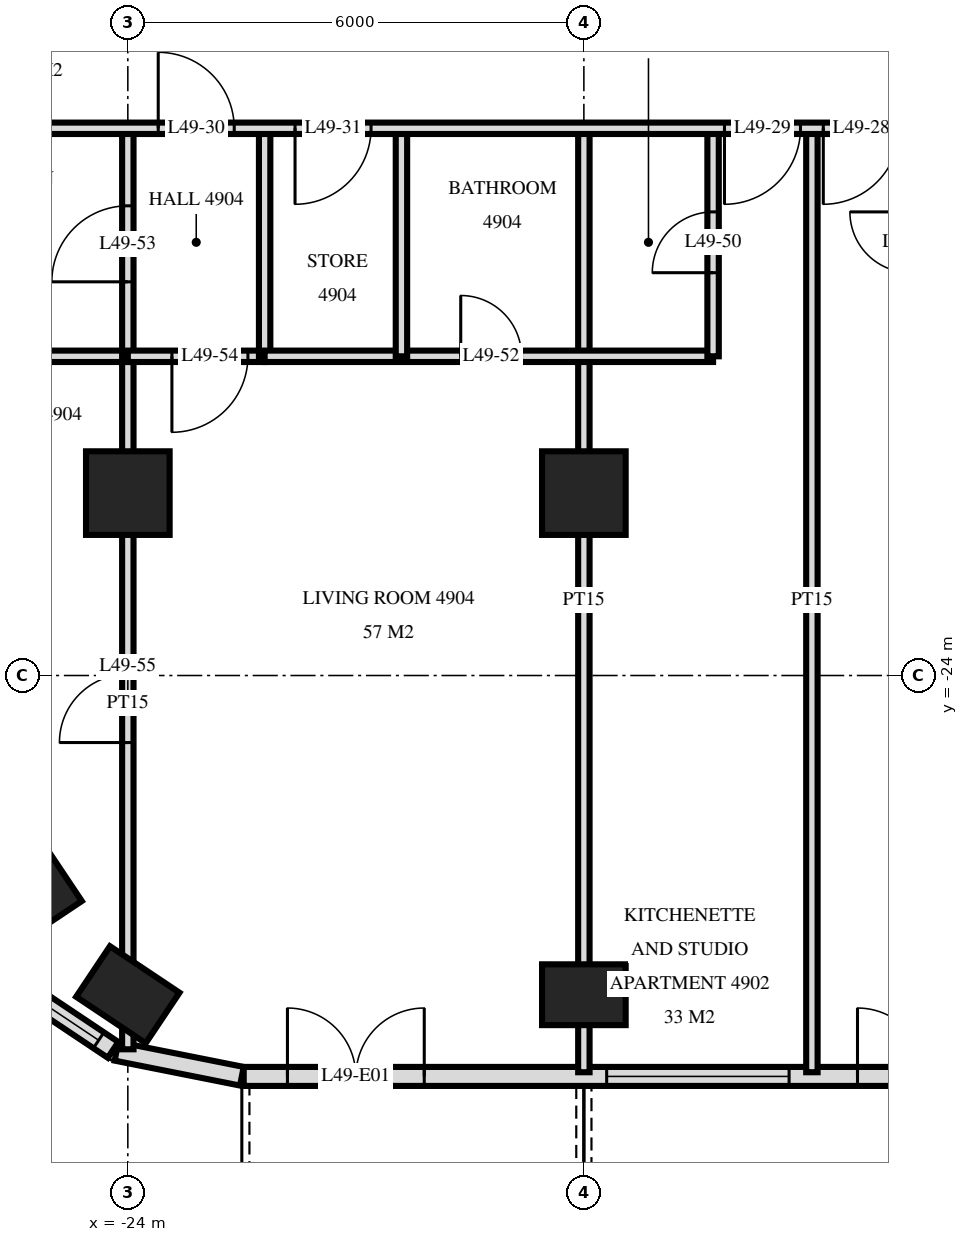
"""IFC4 building model, lengths in metres.
Left out: names, types, materials, properties, quantities, classifications, styles, units other than length and angle.
Written with IfcOpenShell. Run it as: python <this file> out.ifc"""

import sys

from ifc_helpers import new_model, si_unit, direction, frame, frame_2d, origin, origin_2d, place, context, subcontext, project, spatial, rectangle, extrude, element, fill, save


model = new_model("IFC4")
c1 = context("Model", 3, precision=1e-05, world=origin(), true_north=direction((0.0, 1.0)))
c2 = subcontext(c1, "Body", "Model", "MODEL_VIEW")
j1 = project(units=[si_unit("LENGTHUNIT", "METRE"), si_unit("PLANEANGLEUNIT", "RADIAN")], contexts=[c1])
p1 = place(None, origin())
s1 = spatial("IfcSite", under=j1, at=p1, CompositionType="ELEMENT")
p2 = place(p1, origin())
s2 = spatial("IfcBuilding", under=s1, at=p2, CompositionType="ELEMENT")
p3 = place(p2, frame((0.0, 0.0, 190.6)))
s3 = spatial("IfcBuildingStorey", under=s2, at=p3, CompositionType="ELEMENT", Elevation=190.6)
for number, where, z_axis, x_axis in (
    (1, (-25.244, -26.733, 0.0), (0.0, 0.0, 1.0), (-0.556, 0.831, 0.0)),
    (2, (-24.0, -28.2, 0.0), (0.0, 0.0, 1.0), (-0.831, 0.556, 0.0)),
):
    element("IfcColumn", number, at=place(p3, frame(where, z_axis=z_axis, x_axis=x_axis)), inside=s3, PredefinedType="COLUMN", context=c2, shape_type="SweptSolid", body=[
        extrude(rectangle(XDim=1.1, YDim=0.8, at=origin_2d()), origin(), (0.0, 0.0, 1.0), 3.5),
    ])
p4 = place(p3, frame((-24.0, -21.6, 0.0), z_axis=(0.0, 0.0, 1.0), x_axis=(1.0, 0.0, 0.0)))
e3 = element("IfcColumn", 3, at=p4, inside=s3, PredefinedType="COLUMN", context=c2, shape_type="SweptSolid", body=[
    extrude(rectangle(XDim=1.1, YDim=1.1, at=origin_2d()), origin(), (0.0, 0.0, 1.0), 3.5),
])
p5 = place(p3, frame((-18.0, -28.2, 0.0), z_axis=(0.0, 0.0, 1.0), x_axis=(1.0, 0.0, 0.0)))
e4 = element("IfcColumn", 4, at=p5, inside=s3, PredefinedType="COLUMN", context=c2, shape_type="SweptSolid", body=[
    extrude(rectangle(XDim=1.1, YDim=0.8, at=origin_2d()), origin(), (0.0, 0.0, 1.0), 3.5),
])
p6 = place(p3, frame((-18.0, -21.6, 0.0), z_axis=(0.0, 0.0, 1.0), x_axis=(1.0, 0.0, 0.0)))
e5 = element("IfcColumn", 5, at=p6, inside=s3, PredefinedType="COLUMN", context=c2, shape_type="SweptSolid", body=[
    extrude(rectangle(XDim=1.1, YDim=1.1, at=origin_2d()), origin(), (0.0, 0.0, 1.0), 3.5),
])
p7 = place(p3, frame((-25.571, -28.006, 0.0), z_axis=(0.0, 0.0, 1.0), x_axis=(0.831482937015, -0.55555029066, 0.0)))
e6 = element("IfcWall", 6, at=p7, inside=s3, PredefinedType="SOLIDWALL", context=c2, shape_type="SweptSolid", body=[
    extrude(rectangle(XDim=1.656, YDim=0.25, at=frame_2d((0.828, 0.0))), origin(), (0.0, 0.0, 1.0), 3.22),
])
p8 = place(p7, frame((0.228, 0.0, 0.9)))
e7 = element("IfcOpeningElement", 7, at=p8, cuts=e6, PredefinedType="OPENING", context=c2, shape_type="SweptSolid", body=[
    extrude(rectangle(XDim=1.2, YDim=1.5, at=frame_2d((0.6, 0.75))), frame((0.0, 0.135, 0.0), z_axis=(0.0, -1.0, 0.0), x_axis=(1.0, 0.0, 0.0)), (0.0, 0.0, 1.0), 0.27),
])
p9 = place(p3, frame((-24.149, -28.945, 0.0), z_axis=(0.0, 0.0, 1.0), x_axis=(0.980775640221, -0.19513878023, 0.0)))
e8 = element("IfcWall", 8, at=p9, inside=s3, PredefinedType="SOLIDWALL", context=c2, shape_type="SweptSolid", body=[
    extrude(rectangle(XDim=1.681, YDim=0.25, at=frame_2d((0.841, 0.0))), origin(), (0.0, 0.0, 1.0), 3.22),
])
p10 = place(p3, frame((-22.475, -29.275, 0.0), z_axis=(0.0, 0.0, 1.0), x_axis=(1.0, 0.0, 0.0)))
e9 = element("IfcWall", 9, at=p10, inside=s3, PredefinedType="SOLIDWALL", context=c2, shape_type="SweptSolid", body=[
    extrude(rectangle(XDim=44.951, YDim=0.25, at=frame_2d((22.475, 0.0))), origin(), (0.0, 0.0, 1.0), 3.22),
])
p11 = place(p10, frame((0.575, 0.0, 0.0)))
e10 = element("IfcOpeningElement", 10, at=p11, cuts=e9, PredefinedType="OPENING", context=c2, shape_type="SweptSolid", body=[
    extrude(rectangle(XDim=1.8, YDim=2.4, at=frame_2d((0.9, 1.2))), frame((0.0, 0.135, 0.0), z_axis=(0.0, -1.0, 0.0), x_axis=(1.0, 0.0, 0.0)), (0.0, 0.0, 1.0), 0.27),
])
p12 = place(p10, frame((4.775, 0.0, 0.9)))
e11 = element("IfcOpeningElement", 11, at=p12, cuts=e9, PredefinedType="OPENING", context=c2, shape_type="SweptSolid", body=[
    extrude(rectangle(XDim=2.4, YDim=1.5, at=frame_2d((1.2, 0.75))), frame((0.0, 0.135, 0.0), z_axis=(0.0, -1.0, 0.0), x_axis=(1.0, 0.0, 0.0)), (0.0, 0.0, 1.0), 0.27),
])
p13 = place(p10, frame((8.075, 0.0, 0.0)))
e12 = element("IfcOpeningElement", 12, at=p13, cuts=e9, PredefinedType="OPENING", context=c2, shape_type="SweptSolid", body=[
    extrude(rectangle(XDim=1.8, YDim=2.4, at=frame_2d((0.9, 1.2))), frame((0.0, 0.135, 0.0), z_axis=(0.0, -1.0, 0.0), x_axis=(1.0, 0.0, 0.0)), (0.0, 0.0, 1.0), 0.27),
])
p14 = place(p10, frame((11.075, 0.0, 0.0)))
e13 = element("IfcOpeningElement", 13, at=p14, cuts=e9, PredefinedType="OPENING", context=c2, shape_type="SweptSolid", body=[
    extrude(rectangle(XDim=1.8, YDim=2.4, at=frame_2d((0.9, 1.2))), frame((0.0, 0.135, 0.0), z_axis=(0.0, -1.0, 0.0), x_axis=(1.0, 0.0, 0.0)), (0.0, 0.0, 1.0), 0.27),
])
p15 = place(p10, frame((13.775, 0.0, 0.9)))
e14 = element("IfcOpeningElement", 14, at=p15, cuts=e9, PredefinedType="OPENING", context=c2, shape_type="SweptSolid", body=[
    extrude(rectangle(XDim=2.4, YDim=1.5, at=frame_2d((1.2, 0.75))), frame((0.0, 0.135, 0.0), z_axis=(0.0, -1.0, 0.0), x_axis=(1.0, 0.0, 0.0)), (0.0, 0.0, 1.0), 0.27),
])
p16 = place(p10, frame((20.075, 0.0, 0.0)))
e15 = element("IfcOpeningElement", 15, at=p16, cuts=e9, PredefinedType="OPENING", context=c2, shape_type="SweptSolid", body=[
    extrude(rectangle(XDim=1.8, YDim=2.4, at=frame_2d((0.9, 1.2))), frame((0.0, 0.135, 0.0), z_axis=(0.0, -1.0, 0.0), x_axis=(1.0, 0.0, 0.0)), (0.0, 0.0, 1.0), 0.27),
])
p17 = place(p10, frame((23.075, 0.0, 0.0)))
e16 = element("IfcOpeningElement", 16, at=p17, cuts=e9, PredefinedType="OPENING", context=c2, shape_type="SweptSolid", body=[
    extrude(rectangle(XDim=1.8, YDim=2.4, at=frame_2d((0.9, 1.2))), frame((0.0, 0.135, 0.0), z_axis=(0.0, -1.0, 0.0), x_axis=(1.0, 0.0, 0.0)), (0.0, 0.0, 1.0), 0.27),
])
p18 = place(p10, frame((29.075, 0.0, 0.0)))
e17 = element("IfcOpeningElement", 17, at=p18, cuts=e9, PredefinedType="OPENING", context=c2, shape_type="SweptSolid", body=[
    extrude(rectangle(XDim=1.8, YDim=2.4, at=frame_2d((0.9, 1.2))), frame((0.0, 0.135, 0.0), z_axis=(0.0, -1.0, 0.0), x_axis=(1.0, 0.0, 0.0)), (0.0, 0.0, 1.0), 0.27),
])
p19 = place(p10, frame((31.775, 0.0, 0.9)))
e18 = element("IfcOpeningElement", 18, at=p19, cuts=e9, PredefinedType="OPENING", context=c2, shape_type="SweptSolid", body=[
    extrude(rectangle(XDim=2.4, YDim=1.5, at=frame_2d((1.2, 0.75))), frame((0.0, 0.135, 0.0), z_axis=(0.0, -1.0, 0.0), x_axis=(1.0, 0.0, 0.0)), (0.0, 0.0, 1.0), 0.27),
])
p20 = place(p10, frame((35.075, 0.0, 0.0)))
e19 = element("IfcOpeningElement", 19, at=p20, cuts=e9, PredefinedType="OPENING", context=c2, shape_type="SweptSolid", body=[
    extrude(rectangle(XDim=1.8, YDim=2.4, at=frame_2d((0.9, 1.2))), frame((0.0, 0.135, 0.0), z_axis=(0.0, -1.0, 0.0), x_axis=(1.0, 0.0, 0.0)), (0.0, 0.0, 1.0), 0.27),
])
p21 = place(p10, frame((37.775, 0.0, 0.9)))
e20 = element("IfcOpeningElement", 20, at=p21, cuts=e9, PredefinedType="OPENING", context=c2, shape_type="SweptSolid", body=[
    extrude(rectangle(XDim=2.4, YDim=1.5, at=frame_2d((1.2, 0.75))), frame((0.0, 0.135, 0.0), z_axis=(0.0, -1.0, 0.0), x_axis=(1.0, 0.0, 0.0)), (0.0, 0.0, 1.0), 0.27),
])
p22 = place(p10, frame((41.075, 0.0, 0.0)))
e21 = element("IfcOpeningElement", 21, at=p22, cuts=e9, PredefinedType="OPENING", context=c2, shape_type="SweptSolid", body=[
    extrude(rectangle(XDim=1.8, YDim=2.4, at=frame_2d((0.9, 1.2))), frame((0.0, 0.135, 0.0), z_axis=(0.0, -1.0, 0.0), x_axis=(1.0, 0.0, 0.0)), (0.0, 0.0, 1.0), 0.27),
])
p23 = place(p3, frame((-15.0, -29.22, 0.0), z_axis=(0.0, 0.0, 1.0), x_axis=(0.0, 1.0, 0.0)))
e22 = element("IfcWall", 22, at=p23, inside=s3, PredefinedType="PARTITIONING", context=c2, shape_type="SweptSolid", body=[
    extrude(rectangle(XDim=12.42, YDim=0.15, at=frame_2d((6.21, 0.0))), origin(), (0.0, 0.0, 1.0), 3.22),
])
p24 = place(p3, frame((-16.3, -19.8, 0.0), z_axis=(0.0, 0.0, 1.0), x_axis=(0.0, 1.0, 0.0)))
e23 = element("IfcWall", 23, at=p24, inside=s3, PredefinedType="PARTITIONING", context=c2, shape_type="SweptSolid", body=[
    extrude(rectangle(XDim=3.0, YDim=0.15, at=frame_2d((1.5, 0.0))), origin(), (0.0, 0.0, 1.0), 3.22),
])
p25 = place(p24, frame((1.1, 0.0, 0.0)))
e24 = element("IfcOpeningElement", 24, at=p25, cuts=e23, PredefinedType="OPENING", context=c2, shape_type="SweptSolid", body=[
    extrude(rectangle(XDim=0.8, YDim=2.1, at=frame_2d((0.4, 1.05))), frame((0.0, 0.085, 0.0), z_axis=(0.0, -1.0, 0.0), x_axis=(1.0, 0.0, 0.0)), (0.0, 0.0, 1.0), 0.17),
])
p26 = place(p3, frame((-18.0, -29.22, 0.0), z_axis=(0.0, 0.0, 1.0), x_axis=(0.0, 1.0, 0.0)))
e25 = element("IfcWall", 25, at=p26, inside=s3, PredefinedType="PARTITIONING", context=c2, shape_type="SweptSolid", body=[
    extrude(rectangle(XDim=12.42, YDim=0.15, at=frame_2d((6.21, 0.0))), origin(), (0.0, 0.0, 1.0), 3.22),
])
for number, where, z_axis, x_axis in (
    (26, (-20.4, -19.8, 0.0), (0.0, 0.0, 1.0), (0.0, 1.0, 0.0)),
    (27, (-22.2, -19.8, 0.0), (0.0, 0.0, 1.0), (0.0, 1.0, 0.0)),
):
    element("IfcWall", number, at=place(p3, frame(where, z_axis=z_axis, x_axis=x_axis)), inside=s3, PredefinedType="PARTITIONING", context=c2, shape_type="SweptSolid", body=[
        extrude(rectangle(XDim=3.0, YDim=0.15, at=frame_2d((1.5, 0.0))), origin(), (0.0, 0.0, 1.0), 3.22),
    ])
p27 = place(p3, frame((-24.0, -19.8, 0.0), z_axis=(0.0, 0.0, 1.0), x_axis=(0.0, 1.0, 0.0)))
e28 = element("IfcWall", 28, at=p27, inside=s3, PredefinedType="PARTITIONING", context=c2, shape_type="SweptSolid", body=[
    extrude(rectangle(XDim=3.0, YDim=0.15, at=frame_2d((1.5, 0.0))), origin(), (0.0, 0.0, 1.0), 3.22),
])
p28 = place(p27, frame((0.98, 0.0, 0.0)))
e29 = element("IfcOpeningElement", 29, at=p28, cuts=e28, PredefinedType="OPENING", context=c2, shape_type="SweptSolid", body=[
    extrude(rectangle(XDim=1.0, YDim=2.1, at=frame_2d((0.5, 1.05))), frame((0.0, 0.085, 0.0), z_axis=(0.0, -1.0, 0.0), x_axis=(1.0, 0.0, 0.0)), (0.0, 0.0, 1.0), 0.17),
])
p29 = place(p3, frame((-24.0, -28.918, 0.0), z_axis=(0.0, 0.0, 1.0), x_axis=(0.0, 1.0, 0.0)))
e30 = element("IfcWall", 30, at=p29, inside=s3, PredefinedType="PARTITIONING", context=c2, shape_type="SweptSolid", body=[
    extrude(rectangle(XDim=9.118, YDim=0.15, at=frame_2d((4.559, 0.0))), origin(), (0.0, 0.0, 1.0), 3.22),
])
p30 = place(p29, frame((4.036, 0.0, 0.0)))
e31 = element("IfcOpeningElement", 31, at=p30, cuts=e30, PredefinedType="OPENING", context=c2, shape_type="SweptSolid", body=[
    extrude(rectangle(XDim=0.9, YDim=2.1, at=frame_2d((0.45, 1.05))), frame((0.0, 0.085, 0.0), z_axis=(0.0, -1.0, 0.0), x_axis=(1.0, 0.0, 0.0)), (0.0, 0.0, 1.0), 0.17),
])
p31 = place(p3, frame((-24.0, -19.8, 0.0), z_axis=(0.0, 0.0, 1.0), x_axis=(1.0, 0.0, 0.0)))
e32 = element("IfcWall", 32, at=p31, inside=s3, PredefinedType="PARTITIONING", context=c2, shape_type="SweptSolid", body=[
    extrude(rectangle(XDim=1.8, YDim=0.15, at=frame_2d((0.9, 0.0))), origin(), (0.0, 0.0, 1.0), 3.22),
])
p32 = place(p31, frame((0.58, 0.0, 0.0)))
e33 = element("IfcOpeningElement", 33, at=p32, cuts=e32, PredefinedType="OPENING", context=c2, shape_type="SweptSolid", body=[
    extrude(rectangle(XDim=1.0, YDim=2.1, at=frame_2d((0.5, 1.05))), frame((0.0, 0.085, 0.0), z_axis=(0.0, -1.0, 0.0), x_axis=(1.0, 0.0, 0.0)), (0.0, 0.0, 1.0), 0.17),
])
p33 = place(p3, frame((-26.82, -19.8, 0.0), z_axis=(0.0, 0.0, 1.0), x_axis=(1.0, 0.0, 0.0)))
e34 = element("IfcWall", 34, at=p33, inside=s3, PredefinedType="PARTITIONING", context=c2, shape_type="SweptSolid", body=[
    extrude(rectangle(XDim=2.82, YDim=0.15, at=frame_2d((1.41, 0.0))), origin(), (0.0, 0.0, 1.0), 3.22),
])
p34 = place(p3, frame((-22.2, -19.8, 0.0), z_axis=(0.0, 0.0, 1.0), x_axis=(1.0, 0.0, 0.0)))
e35 = element("IfcWall", 35, at=p34, inside=s3, PredefinedType="PARTITIONING", context=c2, shape_type="SweptSolid", body=[
    extrude(rectangle(XDim=5.9, YDim=0.15, at=frame_2d((2.95, 0.0))), origin(), (0.0, 0.0, 1.0), 3.22),
])
p35 = place(p34, frame((2.58, 0.0, 0.0)))
e36 = element("IfcOpeningElement", 36, at=p35, cuts=e35, PredefinedType="OPENING", context=c2, shape_type="SweptSolid", body=[
    extrude(rectangle(XDim=0.8, YDim=2.1, at=frame_2d((0.4, 1.05))), frame((0.0, 0.085, 0.0), z_axis=(0.0, -1.0, 0.0), x_axis=(1.0, 0.0, 0.0)), (0.0, 0.0, 1.0), 0.17),
])
p36 = place(p3, frame((-26.82, -16.8, 0.0), z_axis=(0.0, 0.0, 1.0), x_axis=(1.0, 0.0, 0.0)))
e37 = element("IfcWall", 37, at=p36, inside=s3, PredefinedType="PARTITIONING", context=c2, shape_type="SweptSolid", body=[
    extrude(rectangle(XDim=53.64, YDim=0.15, at=frame_2d((26.82, 0.0))), origin(), (0.0, 0.0, 1.0), 3.22),
])
p37 = place(p36, frame((11.97, 0.0, 0.0)))
e38 = element("IfcOpeningElement", 38, at=p37, cuts=e37, PredefinedType="OPENING", context=c2, shape_type="SweptSolid", body=[
    extrude(rectangle(XDim=1.0, YDim=2.1, at=frame_2d((0.5, 1.05))), frame((0.0, 0.085, 0.0), z_axis=(0.0, -1.0, 0.0), x_axis=(1.0, 0.0, 0.0)), (0.0, 0.0, 1.0), 0.17),
])
p38 = place(p36, frame((10.67, 0.0, 0.0)))
e39 = element("IfcOpeningElement", 39, at=p38, cuts=e37, PredefinedType="OPENING", context=c2, shape_type="SweptSolid", body=[
    extrude(rectangle(XDim=1.0, YDim=2.1, at=frame_2d((0.5, 1.05))), frame((0.0, 0.085, 0.0), z_axis=(0.0, -1.0, 0.0), x_axis=(1.0, 0.0, 0.0)), (0.0, 0.0, 1.0), 0.17),
])
p39 = place(p36, frame((3.22, 0.0, 0.0)))
e40 = element("IfcOpeningElement", 40, at=p39, cuts=e37, PredefinedType="OPENING", context=c2, shape_type="SweptSolid", body=[
    extrude(rectangle(XDim=1.0, YDim=2.1, at=frame_2d((0.5, 1.05))), frame((0.0, 0.085, 0.0), z_axis=(0.0, -1.0, 0.0), x_axis=(1.0, 0.0, 0.0)), (0.0, 0.0, 1.0), 0.17),
])
p40 = place(p36, frame((5.02, 0.0, 0.0)))
e41 = element("IfcOpeningElement", 41, at=p40, cuts=e37, PredefinedType="OPENING", context=c2, shape_type="SweptSolid", body=[
    extrude(rectangle(XDim=1.0, YDim=2.1, at=frame_2d((0.5, 1.05))), frame((0.0, 0.085, 0.0), z_axis=(0.0, -1.0, 0.0), x_axis=(1.0, 0.0, 0.0)), (0.0, 0.0, 1.0), 0.17),
])
p41 = place(p36, frame((38.97, 0.0, 0.0)))
e42 = element("IfcOpeningElement", 42, at=p41, cuts=e37, PredefinedType="OPENING", context=c2, shape_type="SweptSolid", body=[
    extrude(rectangle(XDim=1.0, YDim=2.1, at=frame_2d((0.5, 1.05))), frame((0.0, 0.085, 0.0), z_axis=(0.0, -1.0, 0.0), x_axis=(1.0, 0.0, 0.0)), (0.0, 0.0, 1.0), 0.17),
])
p42 = place(p36, frame((48.72, 0.0, 0.0)))
e43 = element("IfcOpeningElement", 43, at=p42, cuts=e37, PredefinedType="OPENING", context=c2, shape_type="SweptSolid", body=[
    extrude(rectangle(XDim=1.0, YDim=2.1, at=frame_2d((0.5, 1.05))), frame((0.0, 0.085, 0.0), z_axis=(0.0, -1.0, 0.0), x_axis=(1.0, 0.0, 0.0)), (0.0, 0.0, 1.0), 0.17),
])
p43 = place(p36, frame((46.92, 0.0, 0.0)))
e44 = element("IfcOpeningElement", 44, at=p43, cuts=e37, PredefinedType="OPENING", context=c2, shape_type="SweptSolid", body=[
    extrude(rectangle(XDim=1.0, YDim=2.1, at=frame_2d((0.5, 1.05))), frame((0.0, 0.085, 0.0), z_axis=(0.0, -1.0, 0.0), x_axis=(1.0, 0.0, 0.0)), (0.0, 0.0, 1.0), 0.17),
])
p44 = place(p36, frame((18.32, 0.0, 0.0)))
e45 = element("IfcOpeningElement", 45, at=p44, cuts=e37, PredefinedType="OPENING", context=c2, shape_type="SweptSolid", body=[
    extrude(rectangle(XDim=1.0, YDim=2.1, at=frame_2d((0.5, 1.05))), frame((0.0, 0.085, 0.0), z_axis=(0.0, -1.0, 0.0), x_axis=(1.0, 0.0, 0.0)), (0.0, 0.0, 1.0), 0.17),
])
p45 = place(p36, frame((26.32, 0.0, 0.0)))
e46 = element("IfcOpeningElement", 46, at=p45, cuts=e37, PredefinedType="OPENING", context=c2, shape_type="SweptSolid", body=[
    extrude(rectangle(XDim=1.0, YDim=2.1, at=frame_2d((0.5, 1.05))), frame((0.0, 0.085, 0.0), z_axis=(0.0, -1.0, 0.0), x_axis=(1.0, 0.0, 0.0)), (0.0, 0.0, 1.0), 0.17),
])
p46 = place(p36, frame((34.32, 0.0, 0.0)))
e47 = element("IfcOpeningElement", 47, at=p46, cuts=e37, PredefinedType="OPENING", context=c2, shape_type="SweptSolid", body=[
    extrude(rectangle(XDim=1.0, YDim=2.1, at=frame_2d((0.5, 1.05))), frame((0.0, 0.085, 0.0), z_axis=(0.0, -1.0, 0.0), x_axis=(1.0, 0.0, 0.0)), (0.0, 0.0, 1.0), 0.17),
])
p47 = place(p8, origin())
e48 = element("IfcWindow", 48, at=p47, inside=s3, PartitioningType="SINGLE_PANEL", PredefinedType="WINDOW", context=c2, shape_type="SweptSolid", body=[
    extrude(rectangle(XDim=1.2, YDim=1.5, at=frame_2d((0.6, 0.75))), frame((0.0, 0.03, 0.0), z_axis=(0.0, -1.0, 0.0), x_axis=(1.0, 0.0, 0.0)), (0.0, 0.0, 1.0), 0.06),
])
fill(e7, e48)
p48 = place(p11, origin())
e49 = element("IfcDoor", 49, at=p48, inside=s3, OperationType="DOUBLE_DOOR_SINGLE_SWING", PredefinedType="DOOR", context=c2, shape_type="SweptSolid", body=[
    extrude(rectangle(XDim=1.8, YDim=2.4, at=frame_2d((0.9, 1.2))), frame((0.0, 0.025, 0.0), z_axis=(0.0, -1.0, 0.0), x_axis=(1.0, 0.0, 0.0)), (0.0, 0.0, 1.0), 0.05),
])
fill(e10, e49)
p49 = place(p12, origin())
e50 = element("IfcWindow", 50, at=p49, inside=s3, PartitioningType="SINGLE_PANEL", PredefinedType="WINDOW", context=c2, shape_type="SweptSolid", body=[
    extrude(rectangle(XDim=2.4, YDim=1.5, at=frame_2d((1.2, 0.75))), frame((0.0, 0.03, 0.0), z_axis=(0.0, -1.0, 0.0), x_axis=(1.0, 0.0, 0.0)), (0.0, 0.0, 1.0), 0.06),
])
fill(e11, e50)
p50 = place(p13, origin())
e51 = element("IfcDoor", 51, at=p50, inside=s3, OperationType="DOUBLE_DOOR_SINGLE_SWING", PredefinedType="DOOR", context=c2, shape_type="SweptSolid", body=[
    extrude(rectangle(XDim=1.8, YDim=2.4, at=frame_2d((0.9, 1.2))), frame((0.0, 0.025, 0.0), z_axis=(0.0, -1.0, 0.0), x_axis=(1.0, 0.0, 0.0)), (0.0, 0.0, 1.0), 0.05),
])
fill(e12, e51)
p51 = place(p37, frame((0.5, 0.0, 0.0), z_axis=(0.0, 0.0, 1.0), x_axis=(-1.0, 0.0, 0.0)))
e52 = element("IfcDoor", 52, at=p51, inside=s3, OperationType="SINGLE_SWING_LEFT", PredefinedType="DOOR", context=c2, shape_type="SweptSolid", body=[
    extrude(rectangle(XDim=1.0, YDim=2.1, at=frame_2d((0.0, 1.05))), frame((0.0, -0.025, 0.0), z_axis=(0.0, 1.0, 0.0), x_axis=(-1.0, 0.0, 0.0)), (0.0, 0.0, 1.0), 0.05),
])
fill(e38, e52)
p52 = place(p38, frame((0.5, 0.0, 0.0), z_axis=(0.0, 0.0, 1.0), x_axis=(-1.0, 0.0, 0.0)))
e53 = element("IfcDoor", 53, at=p52, inside=s3, OperationType="SINGLE_SWING_LEFT", PredefinedType="DOOR", context=c2, shape_type="SweptSolid", body=[
    extrude(rectangle(XDim=1.0, YDim=2.1, at=frame_2d((0.0, 1.05))), frame((0.0, -0.025, 0.0), z_axis=(0.0, 1.0, 0.0), x_axis=(-1.0, 0.0, 0.0)), (0.0, 0.0, 1.0), 0.05),
])
fill(e39, e53)
p53 = place(p39, origin())
e54 = element("IfcDoor", 54, at=p53, inside=s3, OperationType="SINGLE_SWING_RIGHT", PredefinedType="DOOR", context=c2, shape_type="SweptSolid", body=[
    extrude(rectangle(XDim=1.0, YDim=2.1, at=frame_2d((0.5, 1.05))), frame((0.0, 0.025, 0.0), z_axis=(0.0, -1.0, 0.0), x_axis=(1.0, 0.0, 0.0)), (0.0, 0.0, 1.0), 0.05),
])
fill(e40, e54)
p54 = place(p40, frame((0.5, 0.0, 0.0), z_axis=(0.0, 0.0, 1.0), x_axis=(-1.0, 0.0, 0.0)))
e55 = element("IfcDoor", 55, at=p54, inside=s3, OperationType="SINGLE_SWING_LEFT", PredefinedType="DOOR", context=c2, shape_type="SweptSolid", body=[
    extrude(rectangle(XDim=1.0, YDim=2.1, at=frame_2d((0.0, 1.05))), frame((0.0, -0.025, 0.0), z_axis=(0.0, 1.0, 0.0), x_axis=(-1.0, 0.0, 0.0)), (0.0, 0.0, 1.0), 0.05),
])
fill(e41, e55)
p55 = place(p25, origin())
e56 = element("IfcDoor", 56, at=p55, inside=s3, OperationType="SINGLE_SWING_RIGHT", PredefinedType="DOOR", context=c2, shape_type="SweptSolid", body=[
    extrude(rectangle(XDim=0.8, YDim=2.1, at=frame_2d((0.4, 1.05))), frame((0.0, 0.025, 0.0), z_axis=(0.0, -1.0, 0.0), x_axis=(1.0, 0.0, 0.0)), (0.0, 0.0, 1.0), 0.05),
])
fill(e24, e56)
p56 = place(p35, origin())
e57 = element("IfcDoor", 57, at=p56, inside=s3, OperationType="SINGLE_SWING_RIGHT", PredefinedType="DOOR", context=c2, shape_type="SweptSolid", body=[
    extrude(rectangle(XDim=0.8, YDim=2.1, at=frame_2d((0.4, 1.05))), frame((0.0, 0.025, 0.0), z_axis=(0.0, -1.0, 0.0), x_axis=(1.0, 0.0, 0.0)), (0.0, 0.0, 1.0), 0.05),
])
fill(e36, e57)
p57 = place(p28, origin())
e58 = element("IfcDoor", 58, at=p57, inside=s3, OperationType="SINGLE_SWING_RIGHT", PredefinedType="DOOR", context=c2, shape_type="SweptSolid", body=[
    extrude(rectangle(XDim=1.0, YDim=2.1, at=frame_2d((0.5, 1.05))), frame((0.0, 0.025, 0.0), z_axis=(0.0, -1.0, 0.0), x_axis=(1.0, 0.0, 0.0)), (0.0, 0.0, 1.0), 0.05),
])
fill(e29, e58)
p58 = place(p32, frame((0.5, 0.0, 0.0), z_axis=(0.0, 0.0, 1.0), x_axis=(-1.0, 0.0, 0.0)))
e59 = element("IfcDoor", 59, at=p58, inside=s3, OperationType="SINGLE_SWING_LEFT", PredefinedType="DOOR", context=c2, shape_type="SweptSolid", body=[
    extrude(rectangle(XDim=1.0, YDim=2.1, at=frame_2d((0.0, 1.05))), frame((0.0, -0.025, 0.0), z_axis=(0.0, 1.0, 0.0), x_axis=(-1.0, 0.0, 0.0)), (0.0, 0.0, 1.0), 0.05),
])
fill(e33, e59)
p59 = place(p30, origin())
e60 = element("IfcDoor", 60, at=p59, inside=s3, OperationType="SINGLE_SWING_RIGHT", PredefinedType="DOOR", context=c2, shape_type="SweptSolid", body=[
    extrude(rectangle(XDim=0.9, YDim=2.1, at=frame_2d((0.45, 1.05))), frame((0.0, 0.025, 0.0), z_axis=(0.0, -1.0, 0.0), x_axis=(1.0, 0.0, 0.0)), (0.0, 0.0, 1.0), 0.05),
])
fill(e31, e60)
save(model, sys.argv[1])
